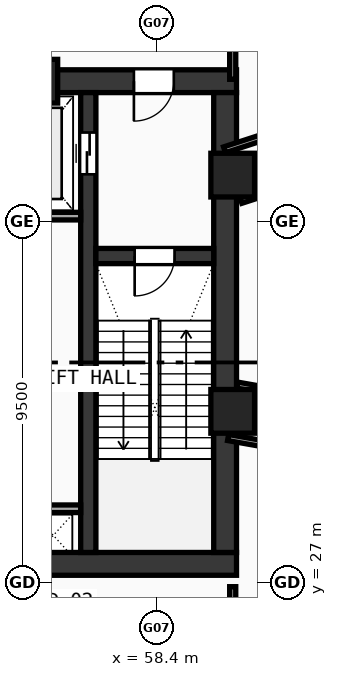
"""IFC4 building model, lengths in metres.
Left out: names, types, materials, properties, quantities, classifications, styles, units other than length and angle.
Written with IfcOpenShell. Run it as: python <this file> out.ifc"""

import sys

from ifc_helpers import new_model, si_unit, direction, frame, frame_2d, origin, origin_with_axes, origin_2d, place, context, subcontext, project, spatial, rectangle, hollow_rectangle, extrude, source, transform, mapped, element, fill, save


model = new_model("IFC4")
c1 = context("Model", 3, precision=1e-05, world=origin(), true_north=direction((0.0, 1.0)))
c2 = subcontext(c1, "Body", "Model", "MODEL_VIEW")
j1 = project(units=[si_unit("LENGTHUNIT", "METRE"), si_unit("PLANEANGLEUNIT", "RADIAN")], contexts=[c1])
p1 = place(None, origin())
s1 = spatial("IfcSite", under=j1, at=p1, CompositionType="ELEMENT")
p2 = place(p1, origin())
s2 = spatial("IfcBuilding", under=s1, at=p2, CompositionType="ELEMENT")
p3 = place(p2, frame((0.0, 0.0, 76.38)))
s3 = spatial("IfcBuildingStorey", under=s2, at=p3, CompositionType="ELEMENT", Elevation=76.38)
p4 = place(p3, frame((35.5, 27.5, 0.0), z_axis=(0.0, 0.0, 1.0), x_axis=(1.0, 0.0, 0.0)))
e1 = element("IfcWall", 1, at=p4, inside=s3, PredefinedType="SHEAR", context=c2, shape_type="SweptSolid", body=[
    extrude(rectangle(XDim=25.0, YDim=0.6, at=frame_2d((12.5, 0.0))), origin(), (0.0, 0.0, 1.0), 4.54),
])
p5 = place(p4, frame((4.65, 0.0, 0.0)))
e2 = element("IfcOpeningElement", 2, at=p5, cuts=e1, PredefinedType="OPENING", context=c2, shape_type="SweptSolid", body=[
    extrude(rectangle(XDim=1.05, YDim=2.1, at=frame_2d((0.525, 1.05))), frame((0.0, 0.31, 0.0), z_axis=(0.0, -1.0, 0.0), x_axis=(1.0, 0.0, 0.0)), (0.0, 0.0, 1.0), 0.62),
])
p6 = place(p3, frame((49.2, 40.2, 0.0), z_axis=(0.0, 0.0, 1.0), x_axis=(1.0, 0.0, 0.0)))
e3 = element("IfcWall", 3, at=p6, inside=s3, PredefinedType="SHEAR", context=c2, shape_type="SweptSolid", body=[
    extrude(rectangle(XDim=11.3, YDim=0.6, at=frame_2d((5.65, 0.0))), origin(), (0.0, 0.0, 1.0), 4.54),
])
p7 = place(p6, frame((8.6, 0.0, 0.0)))
e4 = element("IfcOpeningElement", 4, at=p7, cuts=e3, PredefinedType="OPENING", context=c2, shape_type="SweptSolid", body=[
    extrude(rectangle(XDim=1.05, YDim=2.1, at=frame_2d((0.525, 1.05))), frame((0.0, 0.31, 0.0), z_axis=(0.0, -1.0, 0.0), x_axis=(1.0, 0.0, 0.0)), (0.0, 0.0, 1.0), 0.62),
])
p8 = place(p3, frame((60.2, 27.8, 0.0), z_axis=(0.0, 0.0, 1.0), x_axis=(0.0, 1.0, 0.0)))
e5 = element("IfcWall", 5, at=p8, inside=s3, PredefinedType="SHEAR", context=c2, shape_type="SweptSolid", body=[
    extrude(rectangle(XDim=12.1, YDim=0.6, at=frame_2d((6.05, 0.0))), origin(), (0.0, 0.0, 1.0), 4.54),
])
p9 = place(p3, frame((56.6, 27.8, 0.0), z_axis=(0.0, 0.0, 1.0), x_axis=(0.0, 1.0, 0.0)))
e6 = element("IfcWall", 6, at=p9, inside=s3, PredefinedType="SHEAR", context=c2, shape_type="SweptSolid", body=[
    extrude(rectangle(XDim=12.1, YDim=0.4, at=frame_2d((6.05, 0.0))), origin(), (0.0, 0.0, 1.0), 4.54),
])
p10 = place(p9, frame((9.95, 0.0, 0.0)))
e7 = element("IfcOpeningElement", 7, at=p10, cuts=e6, PredefinedType="OPENING", context=c2, shape_type="SweptSolid", body=[
    extrude(rectangle(XDim=1.1, YDim=2.1, at=frame_2d((0.55, 1.05))), frame((0.0, 0.21, 0.0), z_axis=(0.0, -1.0, 0.0), x_axis=(1.0, 0.0, 0.0)), (0.0, 0.0, 1.0), 0.42),
])
p11 = place(p3, frame((56.8, 35.6, 0.0), z_axis=(0.0, 0.0, 1.0), x_axis=(1.0, 0.0, 0.0)))
e8 = element("IfcWall", 8, at=p11, inside=s3, PredefinedType="SHEAR", context=c2, shape_type="SweptSolid", body=[
    extrude(rectangle(XDim=3.1, YDim=0.4, at=frame_2d((1.55, 0.0))), origin(), (0.0, 0.0, 1.0), 4.54),
])
p12 = place(p11, frame((1.02, 0.0, 0.0)))
e9 = element("IfcOpeningElement", 9, at=p12, cuts=e8, PredefinedType="OPENING", context=c2, shape_type="SweptSolid", body=[
    extrude(rectangle(XDim=1.05, YDim=2.1, at=frame_2d((0.525, 1.05))), frame((0.0, 0.21, 0.0), z_axis=(0.0, -1.0, 0.0), x_axis=(1.0, 0.0, 0.0)), (0.0, 0.0, 1.0), 0.42),
])
m1 = source(origin(), c2, "Body", "SweptSolid", [
    extrude(hollow_rectangle(XDim=1.15, YDim=1.15, WallThickness=0.048, at=origin_2d()), origin(), (0.0, 0.0, 1.0), 4.82),
])
for number, where, z_axis, x_axis in (
    (10, (60.4, 31.513, -0.28), (0.0, 0.0, 1.0), (1.0, 0.0, 0.0)),
    (11, (60.4, 37.729, -0.28), (0.0, 0.0, 1.0), (1.0, 0.0, 0.0)),
    (12, (55.219, 40.2, -0.28), (0.0, 0.0, 1.0), (1.0, 0.0, 0.0)),
):
    element("IfcColumn", number, at=place(p3, frame(where, z_axis=z_axis, x_axis=x_axis)), inside=s3, PredefinedType="COLUMN", context=c2, shape_type="MappedRepresentation", body=[
        mapped(m1, transform((0.0, 0.0, 0.0), scale=1.0)),
    ])
p13 = place(p3, frame((53.68, 36.65, 0.0), z_axis=(0.0, 0.0, 1.0), x_axis=(1.0, 0.0, 0.0)))
e13 = element("IfcWall", 13, at=p13, inside=s3, PredefinedType="SOLIDWALL", context=c2, shape_type="SweptSolid", body=[
    extrude(rectangle(XDim=2.72, YDim=0.2, at=frame_2d((1.36, 0.0))), origin(), (0.0, 0.0, 1.0), 4.54),
])
p14 = place(p3, frame((55.12, 28.95, 0.0), z_axis=(0.0, 0.0, 1.0), x_axis=(1.0, 0.0, 0.0)))
e14 = element("IfcWall", 14, at=p14, inside=s3, PredefinedType="SOLIDWALL", context=c2, shape_type="SweptSolid", body=[
    extrude(rectangle(XDim=1.28, YDim=0.2, at=frame_2d((0.64, 0.0))), origin(), (0.0, 0.0, 1.0), 4.54),
])
p15 = place(p3, frame((60.278, 30.824, 0.0), z_axis=(0.0, 0.0, 1.0), x_axis=(0.984807902687, -0.173647328815, 0.0)))
e15 = element("IfcWall", 15, at=p15, inside=s3, PredefinedType="PARTITIONING", context=c2, shape_type="SweptSolid", body=[
    extrude(rectangle(XDim=29.065, YDim=0.16, at=frame_2d((14.533, 0.0))), origin(), (0.0, 0.0, 1.0), 3.84),
])
p16 = place(p3, frame((60.521, 32.203, 0.0), z_axis=(0.0, 0.0, 1.0), x_axis=(0.984808219267, -0.173645533386, 0.0)))
e16 = element("IfcWall", 16, at=p16, inside=s3, PredefinedType="PARTITIONING", context=c2, shape_type="SweptSolid", body=[
    extrude(rectangle(XDim=28.194, YDim=0.16, at=frame_2d((14.097, 0.0))), origin(), (0.0, 0.0, 1.0), 3.84),
])
p17 = place(p3, frame((60.616, 37.063, 0.0), z_axis=(0.0, 0.0, 1.0), x_axis=(0.951055634406, 0.309019708539, 0.0)))
e17 = element("IfcWall", 17, at=p17, inside=s3, PredefinedType="PARTITIONING", context=c2, shape_type="SweptSolid", body=[
    extrude(rectangle(XDim=21.711, YDim=0.16, at=frame_2d((10.856, 0.0))), origin(), (0.0, 0.0, 1.0), 3.84),
])
p18 = place(p3, frame((60.184, 38.395, 0.0), z_axis=(0.0, 0.0, 1.0), x_axis=(0.951057789573, 0.309013075603, 0.0)))
e18 = element("IfcWall", 18, at=p18, inside=s3, PredefinedType="PARTITIONING", context=c2, shape_type="SweptSolid", body=[
    extrude(rectangle(XDim=21.478, YDim=0.16, at=frame_2d((10.739, 0.0))), origin(), (0.0, 0.0, 1.0), 3.84),
])
p19 = place(p3, frame((60.4, 42.8, 0.0), z_axis=(0.0, 0.0, 1.0), x_axis=(0.0, -1.0, 0.0)))
e19 = element("IfcWall", 19, at=p19, inside=s3, PredefinedType="PARTITIONING", context=c2, shape_type="SweptSolid", body=[
    extrude(rectangle(XDim=2.55, YDim=0.16, at=frame_2d((1.275, 0.0))), origin(), (0.0, 0.0, 1.0), 4.54),
])
p20 = place(p3, frame((60.4, 26.9, 0.0), z_axis=(0.0, 0.0, 1.0), x_axis=(0.0, -1.0, 0.0)))
e20 = element("IfcWall", 20, at=p20, inside=s3, PredefinedType="PARTITIONING", context=c2, shape_type="SweptSolid", body=[
    extrude(rectangle(XDim=2.0, YDim=0.16, at=frame_2d((1.0, 0.0))), origin(), (0.0, 0.0, 1.0), 4.54),
])
m2 = source(origin(), c2, "Body", "SweptSolid", [
    extrude(rectangle(XDim=1.05, YDim=2.1, at=frame_2d((0.525, 1.05))), frame((0.0, 0.025, 0.0), z_axis=(0.0, -1.0, 0.0), x_axis=(1.0, 0.0, 0.0)), (0.0, 0.0, 1.0), 0.05),
])
p21 = place(p12, frame((1.05, 0.0, 0.0), z_axis=(0.0, 0.0, 1.0), x_axis=(-1.0, 0.0, 0.0)))
e21 = element("IfcDoor", 21, at=p21, inside=s3, OperationType="SINGLE_SWING_RIGHT", PredefinedType="DOOR", context=c2, shape_type="MappedRepresentation", body=[
    mapped(m2, transform((0.0, 0.0, 0.0), scale=1.0)),
])
fill(e9, e21)
p22 = place(p7, frame((1.05, 0.0, 0.0), z_axis=(0.0, 0.0, 1.0), x_axis=(-1.0, 0.0, 0.0)))
e22 = element("IfcDoor", 22, at=p22, inside=s3, OperationType="SINGLE_SWING_RIGHT", PredefinedType="DOOR", context=c2, shape_type="MappedRepresentation", body=[
    mapped(m2, transform((0.0, 0.0, 0.0), scale=1.0)),
])
fill(e4, e22)
m3 = source(origin(), c2, "Body", "SweptSolid", [
    extrude(rectangle(XDim=1.1, YDim=2.1, at=frame_2d((0.55, 1.05))), frame((0.0, 0.025, 0.0), z_axis=(0.0, -1.0, 0.0), x_axis=(1.0, 0.0, 0.0)), (0.0, 0.0, 1.0), 0.05),
])
p23 = place(p10, origin_with_axes())
e23 = element("IfcDoor", 23, at=p23, inside=s3, OperationType="DOUBLE_DOOR_SLIDING", PredefinedType="DOOR", context=c2, shape_type="MappedRepresentation", body=[
    mapped(m3, transform((0.0, 0.0, 0.0), scale=1.0)),
])
fill(e7, e23)
save(model, sys.argv[1])
